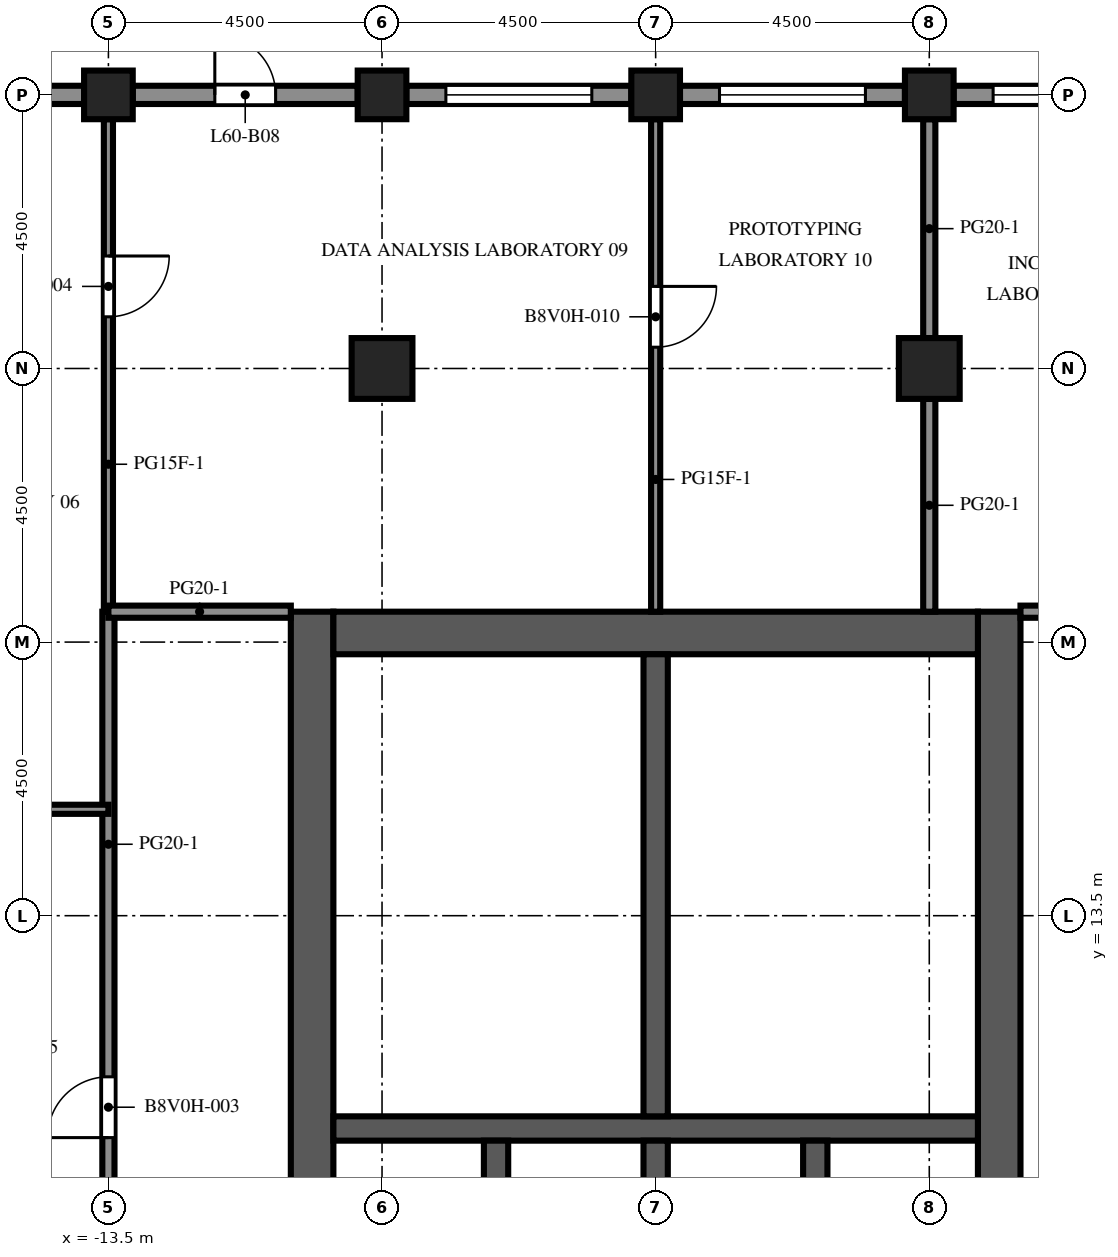
"""IFC4 building model, lengths in metres.
Left out: names, types, materials, properties, quantities, classifications, styles, units other than length and angle.
Written with IfcOpenShell. Run it as: python <this file> out.ifc"""

import sys

from ifc_helpers import new_model, si_unit, direction, frame, frame_2d, origin, origin_2d, place, context, subcontext, project, spatial, rectangle, extrude, element, fill, save


model = new_model("IFC4")
c1 = context("Model", 3, precision=1e-05, world=origin(), true_north=direction((0.0, 1.0)))
c2 = subcontext(c1, "Body", "Model", "MODEL_VIEW")
j1 = project(units=[si_unit("LENGTHUNIT", "METRE"), si_unit("PLANEANGLEUNIT", "RADIAN")], contexts=[c1])
p1 = place(None, origin())
s1 = spatial("IfcSite", under=j1, at=p1, CompositionType="ELEMENT")
p2 = place(p1, origin())
s2 = spatial("IfcBuilding", under=s1, at=p2, CompositionType="ELEMENT")
p3 = place(p2, frame((0.0, 0.0, 266.3)))
s3 = spatial("IfcBuildingStorey", under=s2, at=p3, CompositionType="ELEMENT", Elevation=266.3)
for number, where, z_axis, x_axis in (
    (1, (-13.5, 27.0, -0.45), (0.0, 0.0, 1.0), (1.0, 0.0, 0.0)),
    (2, (-9.0, 27.0, -0.45), (0.0, 0.0, 1.0), (1.0, 0.0, 0.0)),
    (3, (-4.5, 27.0, -0.45), (0.0, 0.0, 1.0), (1.0, 0.0, 0.0)),
    (4, (0.0, 27.0, -0.45), (0.0, 0.0, 1.0), (1.0, 0.0, 0.0)),
):
    element("IfcColumn", number, at=place(p3, frame(where, z_axis=z_axis, x_axis=x_axis)), inside=s3, PredefinedType="COLUMN", context=c2, shape_type="SweptSolid", body=[
        extrude(rectangle(XDim=0.8, YDim=0.8, at=origin_2d()), origin(), (0.0, 0.0, 1.0), 4.55),
    ])
for number, where, z_axis, x_axis in (
    (5, (-9.0, 22.5, 0.0), (0.0, 0.0, 1.0), (1.0, 0.0, 0.0)),
    (6, (0.0, 22.5, 0.0), (0.0, 0.0, 1.0), (1.0, 0.0, 0.0)),
):
    element("IfcColumn", number, at=place(p3, frame(where, z_axis=z_axis, x_axis=x_axis)), inside=s3, PredefinedType="COLUMN", context=c2, shape_type="SweptSolid", body=[
        extrude(rectangle(XDim=1.0, YDim=1.0, at=origin_2d()), origin(), (0.0, 0.0, 1.0), 4.1),
    ])
p4 = place(p3, frame((-10.15, -9.0, 0.0), z_axis=(0.0, 0.0, 1.0), x_axis=(0.0, 1.0, 0.0)))
e7 = element("IfcWall", 7, at=p4, inside=s3, PredefinedType="SHEAR", context=c2, shape_type="SweptSolid", body=[
    extrude(rectangle(XDim=27.5, YDim=0.7, at=frame_2d((13.75, 0.0))), origin(), (0.0, 0.0, 1.0), 4.1),
])
p5 = place(p4, frame((12.55, 0.0, 0.0)))
e8 = element("IfcOpeningElement", 8, at=p5, cuts=e7, PredefinedType="OPENING", context=c2, shape_type="SweptSolid", body=[
    extrude(rectangle(XDim=2.4, YDim=2.4, at=frame_2d((1.2, 1.2))), frame((0.0, 0.36, 0.0), z_axis=(0.0, -1.0, 0.0), x_axis=(1.0, 0.0, 0.0)), (0.0, 0.0, 1.0), 0.72),
])
p6 = place(p4, frame((6.825, 0.0, 0.0)))
e9 = element("IfcOpeningElement", 9, at=p6, cuts=e7, PredefinedType="OPENING", context=c2, shape_type="SweptSolid", body=[
    extrude(rectangle(XDim=1.2, YDim=2.1, at=frame_2d((0.6, 1.05))), frame((0.0, 0.36, 0.0), z_axis=(0.0, -1.0, 0.0), x_axis=(1.0, 0.0, 0.0)), (0.0, 0.0, 1.0), 0.72),
])
p7 = place(p4, frame((19.475, 0.0, 0.0)))
e10 = element("IfcOpeningElement", 10, at=p7, cuts=e7, PredefinedType="OPENING", context=c2, shape_type="SweptSolid", body=[
    extrude(rectangle(XDim=1.2, YDim=2.1, at=frame_2d((0.6, 1.05))), frame((0.0, 0.36, 0.0), z_axis=(0.0, -1.0, 0.0), x_axis=(1.0, 0.0, 0.0)), (0.0, 0.0, 1.0), 0.72),
])
p8 = place(p3, frame((1.15, -9.0, 0.0), z_axis=(0.0, 0.0, 1.0), x_axis=(0.0, 1.0, 0.0)))
e11 = element("IfcWall", 11, at=p8, inside=s3, PredefinedType="SHEAR", context=c2, shape_type="SweptSolid", body=[
    extrude(rectangle(XDim=27.5, YDim=0.7, at=frame_2d((13.75, 0.0))), origin(), (0.0, 0.0, 1.0), 4.1),
])
p9 = place(p8, frame((12.55, 0.0, 0.0)))
e12 = element("IfcOpeningElement", 12, at=p9, cuts=e11, PredefinedType="OPENING", context=c2, shape_type="SweptSolid", body=[
    extrude(rectangle(XDim=2.4, YDim=2.4, at=frame_2d((1.2, 1.2))), frame((0.0, 0.36, 0.0), z_axis=(0.0, -1.0, 0.0), x_axis=(1.0, 0.0, 0.0)), (0.0, 0.0, 1.0), 0.72),
])
p10 = place(p8, frame((3.788, 0.0, 0.0)))
e13 = element("IfcOpeningElement", 13, at=p10, cuts=e11, PredefinedType="OPENING", context=c2, shape_type="SweptSolid", body=[
    extrude(rectangle(XDim=0.968, YDim=2.1, at=frame_2d((0.484, 1.05))), frame((0.0, 0.36, 0.0), z_axis=(0.0, -1.0, 0.0), x_axis=(1.0, 0.0, 0.0)), (0.0, 0.0, 1.0), 0.72),
])
p11 = place(p8, frame((23.54, 0.0, 0.0)))
e14 = element("IfcOpeningElement", 14, at=p11, cuts=e11, PredefinedType="OPENING", context=c2, shape_type="SweptSolid", body=[
    extrude(rectangle(XDim=1.2, YDim=2.1, at=frame_2d((0.6, 1.05))), frame((0.0, 0.36, 0.0), z_axis=(0.0, -1.0, 0.0), x_axis=(1.0, 0.0, 0.0)), (0.0, 0.0, 1.0), 0.72),
])
p12 = place(p3, frame((-9.8, 18.15, 0.0), z_axis=(0.0, 0.0, 1.0), x_axis=(1.0, 0.0, 0.0)))
e15 = element("IfcWall", 15, at=p12, inside=s3, PredefinedType="SHEAR", context=c2, shape_type="SweptSolid", body=[
    extrude(rectangle(XDim=10.6, YDim=0.7, at=frame_2d((5.3, 0.0))), origin(), (0.0, 0.0, 1.0), 4.1),
])
p13 = place(p3, frame((-9.8, 10.0, 0.0), z_axis=(0.0, 0.0, 1.0), x_axis=(1.0, 0.0, 0.0)))
e16 = element("IfcWall", 16, at=p13, inside=s3, PredefinedType="SHEAR", context=c2, shape_type="SweptSolid", body=[
    extrude(rectangle(XDim=10.6, YDim=0.4, at=frame_2d((5.3, 0.0))), origin(), (0.0, 0.0, 1.0), 4.1),
])
for number, where, z_axis, x_axis in (
    (17, (-7.125, 6.9, 0.0), (0.0, 0.0, 1.0), (0.0, 1.0, 0.0)),
    (18, (-4.5, 6.9, 0.0), (0.0, 0.0, 1.0), (0.0, 1.0, 0.0)),
    (19, (-1.875, 6.9, 0.0), (0.0, 0.0, 1.0), (0.0, 1.0, 0.0)),
):
    element("IfcWall", number, at=place(p3, frame(where, z_axis=z_axis, x_axis=x_axis)), inside=s3, PredefinedType="SHEAR", context=c2, shape_type="SweptSolid", body=[
        extrude(rectangle(XDim=2.9, YDim=0.4, at=frame_2d((1.45, 0.0))), origin(), (0.0, 0.0, 1.0), 4.1),
    ])
p14 = place(p3, frame((-4.5, 10.2, 0.0), z_axis=(0.0, 0.0, 1.0), x_axis=(0.0, 1.0, 0.0)))
e20 = element("IfcWall", 20, at=p14, inside=s3, PredefinedType="SHEAR", context=c2, shape_type="SweptSolid", body=[
    extrude(rectangle(XDim=7.6, YDim=0.4, at=frame_2d((3.8, 0.0))), origin(), (0.0, 0.0, 1.0), 4.1),
])
p15 = place(p3, frame((0.4, 27.0, 0.0), z_axis=(0.0, 0.0, 1.0), x_axis=(1.0, 0.0, 0.0)))
e21 = element("IfcWall", 21, at=p15, inside=s3, PredefinedType="SOLIDWALL", context=c2, shape_type="SweptSolid", body=[
    extrude(rectangle(XDim=3.7, YDim=0.3, at=frame_2d((1.85, 0.0))), origin(), (0.0, 0.0, 1.0), 2.85),
])
p16 = place(p15, frame((0.65, 0.0, 0.8)))
e22 = element("IfcOpeningElement", 22, at=p16, cuts=e21, PredefinedType="OPENING", context=c2, shape_type="SweptSolid", body=[
    extrude(rectangle(XDim=2.4, YDim=1.7, at=frame_2d((1.2, 0.85))), frame((0.0, 0.16, 0.0), z_axis=(0.0, -1.0, 0.0), x_axis=(1.0, 0.0, 0.0)), (0.0, 0.0, 1.0), 0.32),
])
p17 = place(p3, frame((-4.1, 27.0, 0.0), z_axis=(0.0, 0.0, 1.0), x_axis=(1.0, 0.0, 0.0)))
e23 = element("IfcWall", 23, at=p17, inside=s3, PredefinedType="SOLIDWALL", context=c2, shape_type="SweptSolid", body=[
    extrude(rectangle(XDim=3.7, YDim=0.3, at=frame_2d((1.85, 0.0))), origin(), (0.0, 0.0, 1.0), 2.85),
])
p18 = place(p17, frame((0.65, 0.0, 0.8)))
e24 = element("IfcOpeningElement", 24, at=p18, cuts=e23, PredefinedType="OPENING", context=c2, shape_type="SweptSolid", body=[
    extrude(rectangle(XDim=2.4, YDim=1.7, at=frame_2d((1.2, 0.85))), frame((0.0, 0.16, 0.0), z_axis=(0.0, -1.0, 0.0), x_axis=(1.0, 0.0, 0.0)), (0.0, 0.0, 1.0), 0.32),
])
p19 = place(p3, frame((-8.6, 27.0, 0.0), z_axis=(0.0, 0.0, 1.0), x_axis=(1.0, 0.0, 0.0)))
e25 = element("IfcWall", 25, at=p19, inside=s3, PredefinedType="SOLIDWALL", context=c2, shape_type="SweptSolid", body=[
    extrude(rectangle(XDim=3.7, YDim=0.3, at=frame_2d((1.85, 0.0))), origin(), (0.0, 0.0, 1.0), 2.85),
])
p20 = place(p19, frame((0.65, 0.0, 0.8)))
e26 = element("IfcOpeningElement", 26, at=p20, cuts=e25, PredefinedType="OPENING", context=c2, shape_type="SweptSolid", body=[
    extrude(rectangle(XDim=2.4, YDim=1.7, at=frame_2d((1.2, 0.85))), frame((0.0, 0.16, 0.0), z_axis=(0.0, -1.0, 0.0), x_axis=(1.0, 0.0, 0.0)), (0.0, 0.0, 1.0), 0.32),
])
p21 = place(p3, frame((-13.1, 27.0, 0.0), z_axis=(0.0, 0.0, 1.0), x_axis=(1.0, 0.0, 0.0)))
e27 = element("IfcWall", 27, at=p21, inside=s3, PredefinedType="SOLIDWALL", context=c2, shape_type="SweptSolid", body=[
    extrude(rectangle(XDim=3.7, YDim=0.3, at=frame_2d((1.85, 0.0))), origin(), (0.0, 0.0, 1.0), 2.85),
])
p22 = place(p21, frame((1.35, 0.0, 0.0)))
e28 = element("IfcOpeningElement", 28, at=p22, cuts=e27, PredefinedType="OPENING", context=c2, shape_type="SweptSolid", body=[
    extrude(rectangle(XDim=1.0, YDim=2.2, at=frame_2d((0.5, 1.1))), frame((0.0, 0.16, 0.0), z_axis=(0.0, -1.0, 0.0), x_axis=(1.0, 0.0, 0.0)), (0.0, 0.0, 1.0), 0.32),
])
p23 = place(p3, frame((-17.6, 27.0, 0.0), z_axis=(0.0, 0.0, 1.0), x_axis=(1.0, 0.0, 0.0)))
e29 = element("IfcWall", 29, at=p23, inside=s3, PredefinedType="SOLIDWALL", context=c2, shape_type="SweptSolid", body=[
    extrude(rectangle(XDim=3.7, YDim=0.3, at=frame_2d((1.85, 0.0))), origin(), (0.0, 0.0, 1.0), 2.85),
])
p24 = place(p23, frame((0.65, 0.0, 0.8)))
e30 = element("IfcOpeningElement", 30, at=p24, cuts=e29, PredefinedType="OPENING", context=c2, shape_type="SweptSolid", body=[
    extrude(rectangle(XDim=2.4, YDim=1.7, at=frame_2d((1.2, 0.85))), frame((0.0, 0.16, 0.0), z_axis=(0.0, -1.0, 0.0), x_axis=(1.0, 0.0, 0.0)), (0.0, 0.0, 1.0), 0.32),
])
p25 = place(p3, frame((-0.5, 12.48, 0.0), z_axis=(0.0, 0.0, 1.0), x_axis=(1.0, 0.0, 0.0)))
e31 = element("IfcWall", 31, at=p25, inside=s3, PredefinedType="PARTITIONING", context=c2, shape_type="SweptSolid", body=[
    extrude(rectangle(XDim=1.3, YDim=0.1, at=frame_2d((0.65, 0.0))), origin(), (0.0, 0.0, 1.0), 3.65),
])
p26 = place(p25, frame((0.2, 0.0, 0.0)))
e32 = element("IfcOpeningElement", 32, at=p26, cuts=e31, PredefinedType="OPENING", context=c2, shape_type="SweptSolid", body=[
    extrude(rectangle(XDim=0.9, YDim=2.1, at=frame_2d((0.45, 1.05))), frame((0.0, 0.06, 0.0), z_axis=(0.0, -1.0, 0.0), x_axis=(1.0, 0.0, 0.0)), (0.0, 0.0, 1.0), 0.12),
])
p27 = place(p3, frame((-4.3, 12.48, 0.0), z_axis=(0.0, 0.0, 1.0), x_axis=(1.0, 0.0, 0.0)))
e33 = element("IfcWall", 33, at=p27, inside=s3, PredefinedType="PARTITIONING", context=c2, shape_type="SweptSolid", body=[
    extrude(rectangle(XDim=3.8, YDim=0.1, at=frame_2d((1.9, 0.0))), origin(), (0.0, 0.0, 1.0), 3.65),
])
p28 = place(p3, frame((-0.5, 12.48, 0.0), z_axis=(0.0, 0.0, 1.0), x_axis=(0.0, 1.0, 0.0)))
e34 = element("IfcWall", 34, at=p28, inside=s3, PredefinedType="PARTITIONING", context=c2, shape_type="SweptSolid", body=[
    extrude(rectangle(XDim=2.66, YDim=0.1, at=frame_2d((1.33, 0.0))), origin(), (0.0, 0.0, 1.0), 3.65),
])
p29 = place(p28, frame((0.83, 0.0, 0.0)))
e35 = element("IfcOpeningElement", 35, at=p29, cuts=e34, PredefinedType="OPENING", context=c2, shape_type="SweptSolid", body=[
    extrude(rectangle(XDim=1.0, YDim=2.1, at=frame_2d((0.5, 1.05))), frame((0.0, 0.06, 0.0), z_axis=(0.0, -1.0, 0.0), x_axis=(1.0, 0.0, 0.0)), (0.0, 0.0, 1.0), 0.12),
])
p30 = place(p3, frame((-0.5, 15.14, 0.0), z_axis=(0.0, 0.0, 1.0), x_axis=(0.0, 1.0, 0.0)))
e36 = element("IfcWall", 36, at=p30, inside=s3, PredefinedType="PARTITIONING", context=c2, shape_type="SweptSolid", body=[
    extrude(rectangle(XDim=2.66, YDim=0.1, at=frame_2d((1.33, 0.0))), origin(), (0.0, 0.0, 1.0), 3.65),
])
p31 = place(p30, frame((0.83, 0.0, 0.0)))
e37 = element("IfcOpeningElement", 37, at=p31, cuts=e36, PredefinedType="OPENING", context=c2, shape_type="SweptSolid", body=[
    extrude(rectangle(XDim=1.0, YDim=2.1, at=frame_2d((0.5, 1.05))), frame((0.0, 0.06, 0.0), z_axis=(0.0, -1.0, 0.0), x_axis=(1.0, 0.0, 0.0)), (0.0, 0.0, 1.0), 0.12),
])
p32 = place(p3, frame((-4.3, 15.14, 0.0), z_axis=(0.0, 0.0, 1.0), x_axis=(1.0, 0.0, 0.0)))
e38 = element("IfcWall", 38, at=p32, inside=s3, PredefinedType="PARTITIONING", context=c2, shape_type="SweptSolid", body=[
    extrude(rectangle(XDim=3.8, YDim=0.1, at=frame_2d((1.9, 0.0))), origin(), (0.0, 0.0, 1.0), 3.65),
])
p33 = place(p3, frame((-13.5, 26.6, 0.0), z_axis=(0.0, 0.0, 1.0), x_axis=(0.0, -1.0, 0.0)))
e39 = element("IfcWall", 39, at=p33, inside=s3, PredefinedType="PARTITIONING", context=c2, shape_type="SweptSolid", body=[
    extrude(rectangle(XDim=8.1, YDim=0.15, at=frame_2d((4.05, 0.0))), origin(), (0.0, 0.0, 1.0), 3.65),
])
p34 = place(p33, frame((2.25, 0.0, 0.0)))
e40 = element("IfcOpeningElement", 40, at=p34, cuts=e39, PredefinedType="OPENING", context=c2, shape_type="SweptSolid", body=[
    extrude(rectangle(XDim=1.0, YDim=2.1, at=frame_2d((0.5, 1.05))), frame((0.0, 0.085, 0.0), z_axis=(0.0, -1.0, 0.0), x_axis=(1.0, 0.0, 0.0)), (0.0, 0.0, 1.0), 0.17),
])
p35 = place(p3, frame((-13.5, 6.25, 0.0), z_axis=(0.0, 0.0, 1.0), x_axis=(0.0, 1.0, 0.0)))
e41 = element("IfcWall", 41, at=p35, inside=s3, PredefinedType="PARTITIONING", context=c2, shape_type="SweptSolid", body=[
    extrude(rectangle(XDim=12.25, YDim=0.2, at=frame_2d((6.125, 0.0))), origin(), (0.0, 0.0, 1.0), 3.65),
])
p36 = place(p35, frame((3.6, 0.0, 0.0)))
e42 = element("IfcOpeningElement", 42, at=p36, cuts=e41, PredefinedType="OPENING", context=c2, shape_type="SweptSolid", body=[
    extrude(rectangle(XDim=1.0, YDim=2.1, at=frame_2d((0.5, 1.05))), frame((0.0, 0.11, 0.0), z_axis=(0.0, -1.0, 0.0), x_axis=(1.0, 0.0, 0.0)), (0.0, 0.0, 1.0), 0.22),
])
p37 = place(p3, frame((-4.5, 26.6, 0.0), z_axis=(0.0, 0.0, 1.0), x_axis=(0.0, -1.0, 0.0)))
e43 = element("IfcWall", 43, at=p37, inside=s3, PredefinedType="PARTITIONING", context=c2, shape_type="SweptSolid", body=[
    extrude(rectangle(XDim=8.1, YDim=0.15, at=frame_2d((4.05, 0.0))), origin(), (0.0, 0.0, 1.0), 3.65),
])
p38 = place(p37, frame((2.75, 0.0, 0.0)))
e44 = element("IfcOpeningElement", 44, at=p38, cuts=e43, PredefinedType="OPENING", context=c2, shape_type="SweptSolid", body=[
    extrude(rectangle(XDim=1.0, YDim=2.1, at=frame_2d((0.5, 1.05))), frame((0.0, 0.085, 0.0), z_axis=(0.0, -1.0, 0.0), x_axis=(1.0, 0.0, 0.0)), (0.0, 0.0, 1.0), 0.17),
])
p39 = place(p3, frame((0.0, 18.5, 0.0), z_axis=(0.0, 0.0, 1.0), x_axis=(0.0, 1.0, 0.0)))
e45 = element("IfcWall", 45, at=p39, inside=s3, PredefinedType="PARTITIONING", context=c2, shape_type="SweptSolid", body=[
    extrude(rectangle(XDim=3.5, YDim=0.2, at=frame_2d((1.75, 0.0))), origin(), (0.0, 0.0, 1.0), 3.65),
])
p40 = place(p3, frame((0.0, 23.0, 0.0), z_axis=(0.0, 0.0, 1.0), x_axis=(0.0, 1.0, 0.0)))
e46 = element("IfcWall", 46, at=p40, inside=s3, PredefinedType="PARTITIONING", context=c2, shape_type="SweptSolid", body=[
    extrude(rectangle(XDim=3.6, YDim=0.2, at=frame_2d((1.8, 0.0))), origin(), (0.0, 0.0, 1.0), 3.65),
])
p41 = place(p3, frame((-22.35, 15.25, 0.0), z_axis=(0.0, 0.0, 1.0), x_axis=(1.0, 0.0, 0.0)))
e47 = element("IfcWall", 47, at=p41, inside=s3, PredefinedType="PARTITIONING", context=c2, shape_type="SweptSolid", body=[
    extrude(rectangle(XDim=8.85, YDim=0.15, at=frame_2d((4.425, 0.0))), origin(), (0.0, 0.0, 1.0), 3.65),
])
p42 = place(p41, frame((3.95, 0.0, 0.0)))
e48 = element("IfcOpeningElement", 48, at=p42, cuts=e47, PredefinedType="OPENING", context=c2, shape_type="SweptSolid", body=[
    extrude(rectangle(XDim=1.0, YDim=2.1, at=frame_2d((0.5, 1.05))), frame((0.0, 0.085, 0.0), z_axis=(0.0, -1.0, 0.0), x_axis=(1.0, 0.0, 0.0)), (0.0, 0.0, 1.0), 0.17),
])
p43 = place(p3, frame((-13.5, 18.5, 0.0), z_axis=(0.0, 0.0, 1.0), x_axis=(1.0, 0.0, 0.0)))
e49 = element("IfcWall", 49, at=p43, inside=s3, PredefinedType="PARTITIONING", context=c2, shape_type="SweptSolid", body=[
    extrude(rectangle(XDim=3.0, YDim=0.2, at=frame_2d((1.5, 0.0))), origin(), (0.0, 0.0, 1.0), 3.65),
])
p44 = place(p3, frame((1.5, 18.5, 0.0), z_axis=(0.0, 0.0, 1.0), x_axis=(1.0, 0.0, 0.0)))
e50 = element("IfcWall", 50, at=p44, inside=s3, PredefinedType="PARTITIONING", context=c2, shape_type="SweptSolid", body=[
    extrude(rectangle(XDim=4.5, YDim=0.2, at=frame_2d((2.25, 0.0))), origin(), (0.0, 0.0, 1.0), 3.65),
])
p45 = place(p44, frame((1.1, 0.0, 0.0)))
e51 = element("IfcOpeningElement", 51, at=p45, cuts=e50, PredefinedType="OPENING", context=c2, shape_type="SweptSolid", body=[
    extrude(rectangle(XDim=1.0, YDim=2.1, at=frame_2d((0.5, 1.05))), frame((0.0, 0.11, 0.0), z_axis=(0.0, -1.0, 0.0), x_axis=(1.0, 0.0, 0.0)), (0.0, 0.0, 1.0), 0.22),
])
p46 = place(p16, origin())
e52 = element("IfcWindow", 52, at=p46, inside=s3, PartitioningType="SINGLE_PANEL", PredefinedType="WINDOW", context=c2, shape_type="SweptSolid", body=[
    extrude(rectangle(XDim=2.4, YDim=1.7, at=frame_2d((1.2, 0.85))), frame((0.0, 0.03, 0.0), z_axis=(0.0, -1.0, 0.0), x_axis=(1.0, 0.0, 0.0)), (0.0, 0.0, 1.0), 0.06),
])
fill(e22, e52)
p47 = place(p18, origin())
e53 = element("IfcWindow", 53, at=p47, inside=s3, PartitioningType="SINGLE_PANEL", PredefinedType="WINDOW", context=c2, shape_type="SweptSolid", body=[
    extrude(rectangle(XDim=2.4, YDim=1.7, at=frame_2d((1.2, 0.85))), frame((0.0, 0.03, 0.0), z_axis=(0.0, -1.0, 0.0), x_axis=(1.0, 0.0, 0.0)), (0.0, 0.0, 1.0), 0.06),
])
fill(e24, e53)
p48 = place(p20, origin())
e54 = element("IfcWindow", 54, at=p48, inside=s3, PartitioningType="SINGLE_PANEL", PredefinedType="WINDOW", context=c2, shape_type="SweptSolid", body=[
    extrude(rectangle(XDim=2.4, YDim=1.7, at=frame_2d((1.2, 0.85))), frame((0.0, 0.03, 0.0), z_axis=(0.0, -1.0, 0.0), x_axis=(1.0, 0.0, 0.0)), (0.0, 0.0, 1.0), 0.06),
])
fill(e26, e54)
p49 = place(p22, origin())
e55 = element("IfcDoor", 55, at=p49, inside=s3, OperationType="SINGLE_SWING_LEFT", PredefinedType="DOOR", context=c2, shape_type="SweptSolid", body=[
    extrude(rectangle(XDim=1.0, YDim=2.2, at=frame_2d((0.5, 1.1))), frame((0.0, 0.025, 0.0), z_axis=(0.0, -1.0, 0.0), x_axis=(1.0, 0.0, 0.0)), (0.0, 0.0, 1.0), 0.05),
])
fill(e28, e55)
p50 = place(p7, origin())
e56 = element("IfcDoor", 56, at=p50, inside=s3, OperationType="SINGLE_SWING_LEFT", PredefinedType="DOOR", context=c2, shape_type="SweptSolid", body=[
    extrude(rectangle(XDim=1.2, YDim=2.1, at=frame_2d((0.6, 1.05))), frame((0.0, 0.025, 0.0), z_axis=(0.0, -1.0, 0.0), x_axis=(1.0, 0.0, 0.0)), (0.0, 0.0, 1.0), 0.05),
])
fill(e10, e56)
p51 = place(p26, origin())
e57 = element("IfcDoor", 57, at=p51, inside=s3, OperationType="SINGLE_SWING_LEFT", PredefinedType="DOOR", context=c2, shape_type="SweptSolid", body=[
    extrude(rectangle(XDim=0.9, YDim=2.1, at=frame_2d((0.45, 1.05))), frame((0.0, 0.025, 0.0), z_axis=(0.0, -1.0, 0.0), x_axis=(1.0, 0.0, 0.0)), (0.0, 0.0, 1.0), 0.05),
])
fill(e32, e57)
p52 = place(p11, origin())
e58 = element("IfcDoor", 58, at=p52, inside=s3, OperationType="SINGLE_SWING_RIGHT", PredefinedType="DOOR", context=c2, shape_type="SweptSolid", body=[
    extrude(rectangle(XDim=1.2, YDim=2.1, at=frame_2d((0.6, 1.05))), frame((0.0, 0.325, 0.0), z_axis=(0.0, -1.0, 0.0), x_axis=(1.0, 0.0, 0.0)), (0.0, 0.0, 1.0), 0.05),
])
fill(e14, e58)
p53 = place(p29, origin())
e59 = element("IfcDoor", 59, at=p53, inside=s3, OperationType="SINGLE_SWING_LEFT", PredefinedType="DOOR", context=c2, shape_type="SweptSolid", body=[
    extrude(rectangle(XDim=1.0, YDim=2.1, at=frame_2d((0.5, 1.05))), frame((0.0, 0.025, 0.0), z_axis=(0.0, -1.0, 0.0), x_axis=(1.0, 0.0, 0.0)), (0.0, 0.0, 1.0), 0.05),
])
fill(e35, e59)
p54 = place(p31, origin())
e60 = element("IfcDoor", 60, at=p54, inside=s3, OperationType="SINGLE_SWING_RIGHT", PredefinedType="DOOR", context=c2, shape_type="SweptSolid", body=[
    extrude(rectangle(XDim=1.0, YDim=2.1, at=frame_2d((0.5, 1.05))), frame((0.0, 0.025, 0.0), z_axis=(0.0, -1.0, 0.0), x_axis=(1.0, 0.0, 0.0)), (0.0, 0.0, 1.0), 0.05),
])
fill(e37, e60)
p55 = place(p36, origin())
e61 = element("IfcDoor", 61, at=p55, inside=s3, OperationType="SINGLE_SWING_LEFT", PredefinedType="DOOR", context=c2, shape_type="SweptSolid", body=[
    extrude(rectangle(XDim=1.0, YDim=2.1, at=frame_2d((0.5, 1.05))), frame((0.0, 0.025, 0.0), z_axis=(0.0, -1.0, 0.0), x_axis=(1.0, 0.0, 0.0)), (0.0, 0.0, 1.0), 0.05),
])
fill(e42, e61)
p56 = place(p34, origin())
e62 = element("IfcDoor", 62, at=p56, inside=s3, OperationType="SINGLE_SWING_LEFT", PredefinedType="DOOR", context=c2, shape_type="SweptSolid", body=[
    extrude(rectangle(XDim=1.0, YDim=2.1, at=frame_2d((0.5, 1.05))), frame((0.0, 0.025, 0.0), z_axis=(0.0, -1.0, 0.0), x_axis=(1.0, 0.0, 0.0)), (0.0, 0.0, 1.0), 0.05),
])
fill(e40, e62)
p57 = place(p38, origin())
e63 = element("IfcDoor", 63, at=p57, inside=s3, OperationType="SINGLE_SWING_LEFT", PredefinedType="DOOR", context=c2, shape_type="SweptSolid", body=[
    extrude(rectangle(XDim=1.0, YDim=2.1, at=frame_2d((0.5, 1.05))), frame((0.0, 0.025, 0.0), z_axis=(0.0, -1.0, 0.0), x_axis=(1.0, 0.0, 0.0)), (0.0, 0.0, 1.0), 0.05),
])
fill(e44, e63)
save(model, sys.argv[1])
